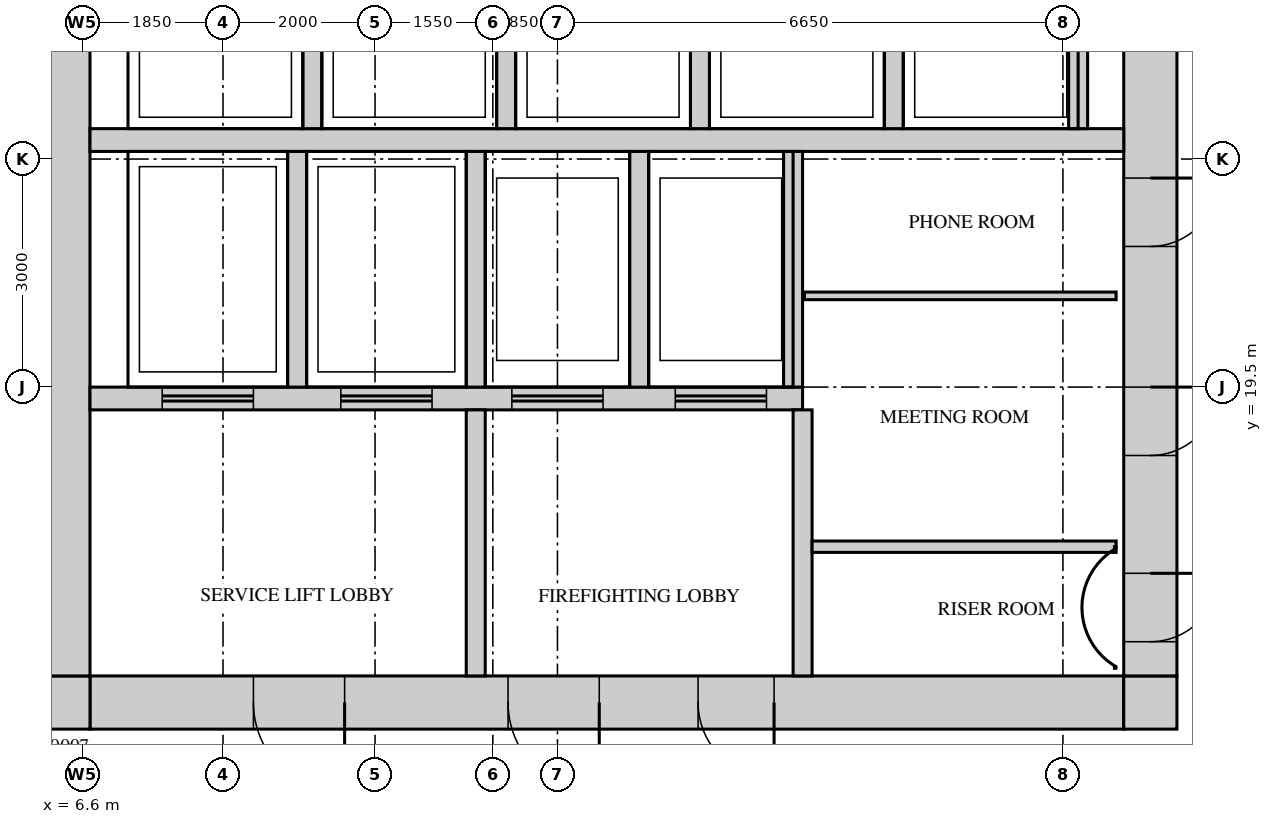
"""IFC4 building model, lengths in metres.
Left out: names, types, materials, properties, quantities, classifications, styles, units other than length and angle.
Written with IfcOpenShell. Run it as: python <this file> out.ifc"""

import sys

from ifc_helpers import new_model, si_unit, direction, frame, frame_2d, origin, place, context, subcontext, project, spatial, rectangle, extrude, source, transform, mapped, element, fill, save


model = new_model("IFC4")
c1 = context("Model", 3, precision=1e-05, world=origin(), true_north=direction((0.0, 1.0)))
c2 = subcontext(c1, "Body", "Model", "MODEL_VIEW")
j1 = project(units=[si_unit("LENGTHUNIT", "METRE"), si_unit("PLANEANGLEUNIT", "RADIAN")], contexts=[c1])
p1 = place(None, origin())
s1 = spatial("IfcSite", under=j1, at=p1, CompositionType="ELEMENT")
p2 = place(p1, origin())
s2 = spatial("IfcBuilding", under=s1, at=p2, CompositionType="ELEMENT")
p3 = place(p2, frame((0.0, 0.0, 246.2)))
s3 = spatial("IfcBuildingStorey", under=s2, at=p3, CompositionType="ELEMENT", Elevation=246.2)
m1 = source(origin(), c2, "Body", "SweptSolid", [
    extrude(rectangle(XDim=13.6, YDim=0.7, at=frame_2d((6.8, 0.0))), origin(), (0.0, 0.0, 1.0), 3.75),
])
p4 = place(p3, frame((6.7, 15.35, 0.0), z_axis=(0.0, 0.0, 1.0), x_axis=(1.0, 0.0, 0.0)))
e1 = element("IfcWall", 1, at=p4, inside=s3, PredefinedType="SHEAR", context=c2, shape_type="MappedRepresentation", body=[
    mapped(m1, transform((0.0, 0.0, 0.0))),
])
m2 = source(origin(), c2, "Body", "SweptSolid", [
    extrude(rectangle(XDim=1.2, YDim=2.1, at=frame_2d((0.6, 1.05))), frame((0.0, 0.36, 0.0), z_axis=(0.0, -1.0, 0.0), x_axis=(1.0, 0.0, 0.0)), (0.0, 0.0, 1.0), 0.72),
])
p5 = place(p4, frame((5.5, 0.0, 0.0)))
e2 = element("IfcOpeningElement", 2, at=p5, cuts=e1, PredefinedType="OPENING", context=c2, shape_type="MappedRepresentation", body=[
    mapped(m2, transform((0.0, 0.0, 0.0))),
])
p6 = place(p4, frame((2.15, 0.0, 0.0)))
e3 = element("IfcOpeningElement", 3, at=p6, cuts=e1, PredefinedType="OPENING", context=c2, shape_type="MappedRepresentation", body=[
    mapped(m2, transform((0.0, 0.0, 0.0))),
])
m3 = source(origin(), c2, "Body", "SweptSolid", [
    extrude(rectangle(XDim=1.0, YDim=2.1, at=frame_2d((0.5, 1.05))), frame((0.0, 0.36, 0.0), z_axis=(0.0, -1.0, 0.0), x_axis=(1.0, 0.0, 0.0)), (0.0, 0.0, 1.0), 0.72),
])
p7 = place(p4, frame((8.0, 0.0, 0.0)))
e4 = element("IfcOpeningElement", 4, at=p7, cuts=e1, PredefinedType="OPENING", context=c2, shape_type="MappedRepresentation", body=[
    mapped(m3, transform((0.0, 0.0, 0.0))),
])
m4 = source(origin(), c2, "Body", "SweptSolid", [
    extrude(rectangle(XDim=0.7, YDim=0.7, at=frame_2d((0.35, 0.0))), origin(), (0.0, 0.0, 1.0), 3.75),
])
for number, where, z_axis, x_axis in (
    (5, (20.3, 15.35, 0.0), (0.0, 0.0, 1.0), (1.0, 0.0, 0.0)),
    (6, (6.0, 15.35, 0.0), (0.0, 0.0, 1.0), (1.0, 0.0, 0.0)),
):
    element("IfcWall", number, at=place(p3, frame(where, z_axis=z_axis, x_axis=x_axis)), inside=s3, PredefinedType="SHEAR", context=c2, shape_type="MappedRepresentation", body=[
        mapped(m4, transform((0.0, 0.0, 0.0))),
    ])
m5 = source(origin(), c2, "Body", "SweptSolid", [
    extrude(rectangle(XDim=22.6, YDim=0.7, at=frame_2d((11.3, 0.0))), origin(), (0.0, 0.0, 1.0), 3.75),
])
p8 = place(p3, frame((20.65, 15.7, 0.0), z_axis=(0.0, 0.0, 1.0), x_axis=(0.0, 1.0, 0.0)))
e7 = element("IfcWall", 7, at=p8, inside=s3, PredefinedType="SHEAR", context=c2, shape_type="MappedRepresentation", body=[
    mapped(m5, transform((0.0, 0.0, 0.0))),
])
m6 = source(origin(), c2, "Body", "SweptSolid", [
    extrude(rectangle(XDim=1.8, YDim=2.1, at=frame_2d((0.9, 1.05))), frame((0.0, 0.36, 0.0), z_axis=(0.0, -1.0, 0.0), x_axis=(1.0, 0.0, 0.0)), (0.0, 0.0, 1.0), 0.72),
])
p9 = place(p8, frame((10.8, 0.0, 0.0)))
e8 = element("IfcOpeningElement", 8, at=p9, cuts=e7, PredefinedType="OPENING", context=c2, shape_type="MappedRepresentation", body=[
    mapped(m6, transform((0.0, 0.0, 0.0))),
])
m7 = source(origin(), c2, "Body", "SweptSolid", [
    extrude(rectangle(XDim=0.9, YDim=2.1, at=frame_2d((0.45, 1.05))), frame((0.0, 0.36, 0.0), z_axis=(0.0, -1.0, 0.0), x_axis=(1.0, 0.0, 0.0)), (0.0, 0.0, 1.0), 0.72),
])
p10 = place(p8, frame((0.45, 0.0, 0.0)))
e9 = element("IfcOpeningElement", 9, at=p10, cuts=e7, PredefinedType="OPENING", context=c2, shape_type="MappedRepresentation", body=[
    mapped(m7, transform((0.0, 0.0, 0.0))),
])
p11 = place(p8, frame((2.9, 0.0, 0.0)))
e10 = element("IfcOpeningElement", 10, at=p11, cuts=e7, PredefinedType="OPENING", context=c2, shape_type="MappedRepresentation", body=[
    mapped(m7, transform((0.0, 0.0, 0.0))),
])
p12 = place(p8, frame((5.65, 0.0, 0.0)))
e11 = element("IfcOpeningElement", 11, at=p12, cuts=e7, PredefinedType="OPENING", context=c2, shape_type="MappedRepresentation", body=[
    mapped(m7, transform((0.0, 0.0, 0.0))),
])
p13 = place(p3, frame((6.35, 15.7, 0.0), z_axis=(0.0, 0.0, 1.0), x_axis=(0.0, 1.0, 0.0)))
e12 = element("IfcWall", 12, at=p13, inside=s3, PredefinedType="SHEAR", context=c2, shape_type="MappedRepresentation", body=[
    mapped(m5, transform((0.0, 0.0, 0.0))),
])
m8 = source(origin(), c2, "Body", "SweptSolid", [
    extrude(rectangle(XDim=13.6, YDim=0.3, at=frame_2d((6.8, 0.0))), origin(), (0.0, 0.0, 1.0), 3.75),
])
p14 = place(p3, frame((6.7, 22.75, 0.0), z_axis=(0.0, 0.0, 1.0), x_axis=(1.0, 0.0, 0.0)))
e13 = element("IfcWall", 13, at=p14, inside=s3, PredefinedType="STANDARD", context=c2, shape_type="MappedRepresentation", body=[
    mapped(m8, transform((0.0, 0.0, 0.0))),
])
m9 = source(origin(), c2, "Body", "SweptSolid", [
    extrude(rectangle(XDim=9.375, YDim=0.3, at=frame_2d((4.688, 0.0))), origin(), (0.0, 0.0, 1.0), 3.75),
])
p15 = place(p3, frame((6.7, 19.35, 0.0), z_axis=(0.0, 0.0, 1.0), x_axis=(1.0, 0.0, 0.0)))
e14 = element("IfcWall", 14, at=p15, inside=s3, PredefinedType="STANDARD", context=c2, shape_type="MappedRepresentation", body=[
    mapped(m9, transform((0.0, 0.0, 0.0))),
])
m10 = source(origin(), c2, "Body", "SweptSolid", [
    extrude(rectangle(XDim=1.2, YDim=2.1, at=frame_2d((0.6, 1.05))), frame((0.0, 0.16, 0.0), z_axis=(0.0, -1.0, 0.0), x_axis=(1.0, 0.0, 0.0)), (0.0, 0.0, 1.0), 0.32),
])
p16 = place(p15, frame((0.95, 0.0, 0.0)))
e15 = element("IfcOpeningElement", 15, at=p16, cuts=e14, PredefinedType="OPENING", context=c2, shape_type="MappedRepresentation", body=[
    mapped(m10, transform((0.0, 0.0, 0.0))),
])
p17 = place(p15, frame((3.3, 0.0, 0.0)))
e16 = element("IfcOpeningElement", 16, at=p17, cuts=e14, PredefinedType="OPENING", context=c2, shape_type="MappedRepresentation", body=[
    mapped(m10, transform((0.0, 0.0, 0.0))),
])
p18 = place(p15, frame((5.55, 0.0, 0.0)))
e17 = element("IfcOpeningElement", 17, at=p18, cuts=e14, PredefinedType="OPENING", context=c2, shape_type="MappedRepresentation", body=[
    mapped(m10, transform((0.0, 0.0, 0.0))),
])
p19 = place(p15, frame((7.7, 0.0, 0.0)))
e18 = element("IfcOpeningElement", 18, at=p19, cuts=e14, PredefinedType="OPENING", context=c2, shape_type="MappedRepresentation", body=[
    mapped(m10, transform((0.0, 0.0, 0.0))),
])
m11 = source(origin(), c2, "Body", "SweptSolid", [
    extrude(rectangle(XDim=3.1, YDim=0.25, at=frame_2d((1.55, 0.0))), origin(), (0.0, 0.0, 1.0), 3.75),
])
for number, where, z_axis, x_axis in (
    (19, (9.425, 19.5, 0.0), (0.0, 0.0, 1.0), (0.0, 1.0, 0.0)),
    (20, (11.775, 19.5, 0.0), (0.0, 0.0, 1.0), (0.0, 1.0, 0.0)),
    (21, (13.925, 19.5, 0.0), (0.0, 0.0, 1.0), (0.0, 1.0, 0.0)),
    (22, (15.95, 19.5, 0.0), (0.0, 0.0, 1.0), (0.0, 1.0, 0.0)),
):
    element("IfcWall", number, at=place(p3, frame(where, z_axis=z_axis, x_axis=x_axis)), inside=s3, PredefinedType="STANDARD", context=c2, shape_type="MappedRepresentation", body=[
        mapped(m11, transform((0.0, 0.0, 0.0))),
    ])
m12 = source(origin(), c2, "Body", "SweptSolid", [
    extrude(rectangle(XDim=2.4, YDim=0.25, at=frame_2d((1.2, 0.0))), origin(), (0.0, 0.0, 1.0), 3.75),
])
for number, where, z_axis, x_axis in (
    (23, (17.275, 22.9, 0.0), (0.0, 0.0, 1.0), (0.0, 1.0, 0.0)),
    (24, (19.7, 22.9, 0.0), (0.0, 0.0, 1.0), (0.0, 1.0, 0.0)),
    (25, (9.625, 22.9, 0.0), (0.0, 0.0, 1.0), (0.0, 1.0, 0.0)),
    (26, (12.175, 22.9, 0.0), (0.0, 0.0, 1.0), (0.0, 1.0, 0.0)),
    (27, (14.725, 22.9, 0.0), (0.0, 0.0, 1.0), (0.0, 1.0, 0.0)),
):
    element("IfcWall", number, at=place(p3, frame(where, z_axis=z_axis, x_axis=x_axis)), inside=s3, PredefinedType="STANDARD", context=c2, shape_type="MappedRepresentation", body=[
        mapped(m12, transform((0.0, 0.0, 0.0))),
    ])
m13 = source(origin(), c2, "Body", "SweptSolid", [
    extrude(rectangle(XDim=3.5, YDim=0.25, at=frame_2d((1.75, 0.0))), origin(), (0.0, 0.0, 1.0), 3.75),
])
for number, where, z_axis, x_axis in (
    (28, (16.075, 15.7, 0.0), (0.0, 0.0, 1.0), (0.0, 1.0, 0.0)),
    (29, (11.775, 15.7, 0.0), (0.0, 0.0, 1.0), (0.0, 1.0, 0.0)),
):
    element("IfcWall", number, at=place(p3, frame(where, z_axis=z_axis, x_axis=x_axis)), inside=s3, PredefinedType="STANDARD", context=c2, shape_type="MappedRepresentation", body=[
        mapped(m13, transform((0.0, 0.0, 0.0))),
    ])
m14 = source(origin(), c2, "Body", "SweptSolid", [
    extrude(rectangle(XDim=4.0, YDim=0.15, at=frame_2d((2.0, 0.0))), origin(), (0.0, 0.0, 1.0), 3.8),
])
p20 = place(p3, frame((16.2, 17.4, 0.0), z_axis=(0.0, 0.0, 1.0), x_axis=(1.0, 0.0, 0.0)))
e30 = element("IfcWall", 30, at=p20, inside=s3, PredefinedType="PARTITIONING", context=c2, shape_type="MappedRepresentation", body=[
    mapped(m14, transform((0.0, 0.0, 0.0))),
])
m15 = source(origin(), c2, "Body", "SweptSolid", [
    extrude(rectangle(XDim=4.1, YDim=0.1, at=frame_2d((2.05, 0.0))), origin(), (0.0, 0.0, 1.0), 3.8),
])
p21 = place(p3, frame((16.1, 20.7, 0.0), z_axis=(0.0, 0.0, 1.0), x_axis=(1.0, 0.0, 0.0)))
e31 = element("IfcWall", 31, at=p21, inside=s3, PredefinedType="PARTITIONING", context=c2, shape_type="MappedRepresentation", body=[
    mapped(m15, transform((0.0, 0.0, 0.0))),
])
m16 = source(origin(), c2, "Body", "SweptSolid", [
    extrude(rectangle(XDim=0.9, YDim=2.1, at=frame_2d((0.45, 1.05))), frame((0.0, 0.3, 0.0), z_axis=(0.0, -1.0, 0.0), x_axis=(1.0, 0.0, 0.0)), (0.0, 0.0, 1.0), 0.6),
])
p22 = place(p10, origin())
e32 = element("IfcDoor", 32, at=p22, inside=s3, OperationType="SINGLE_SWING_RIGHT", PredefinedType="DOOR", context=c2, shape_type="MappedRepresentation", body=[
    mapped(m16, transform((0.0, 0.0, 0.0))),
])
fill(e9, e32)
p23 = place(p11, origin())
e33 = element("IfcDoor", 33, at=p23, inside=s3, OperationType="SINGLE_SWING_RIGHT", PredefinedType="DOOR", context=c2, shape_type="MappedRepresentation", body=[
    mapped(m16, transform((0.0, 0.0, 0.0))),
])
fill(e10, e33)
p24 = place(p12, origin())
e34 = element("IfcDoor", 34, at=p24, inside=s3, OperationType="SINGLE_SWING_RIGHT", PredefinedType="DOOR", context=c2, shape_type="MappedRepresentation", body=[
    mapped(m16, transform((0.0, 0.0, 0.0))),
])
fill(e11, e34)
m17 = source(origin(), c2, "Body", "SweptSolid", [
    extrude(rectangle(XDim=1.2, YDim=2.1, at=frame_2d((0.6, 1.05))), frame((0.0, 0.3, 0.0), z_axis=(0.0, -1.0, 0.0), x_axis=(1.0, 0.0, 0.0)), (0.0, 0.0, 1.0), 0.6),
])
p25 = place(p5, origin())
e35 = element("IfcDoor", 35, at=p25, inside=s3, OperationType="SINGLE_SWING_RIGHT", PredefinedType="DOOR", context=c2, shape_type="MappedRepresentation", body=[
    mapped(m17, transform((0.0, 0.0, 0.0))),
])
fill(e2, e35)
p26 = place(p6, origin())
e36 = element("IfcDoor", 36, at=p26, inside=s3, OperationType="SINGLE_SWING_RIGHT", PredefinedType="DOOR", context=c2, shape_type="MappedRepresentation", body=[
    mapped(m17, transform((0.0, 0.0, 0.0))),
])
fill(e3, e36)
m18 = source(origin(), c2, "Body", "SweptSolid", [
    extrude(rectangle(XDim=1.0, YDim=2.1, at=frame_2d((0.5, 1.05))), frame((0.0, 0.3, 0.0), z_axis=(0.0, -1.0, 0.0), x_axis=(1.0, 0.0, 0.0)), (0.0, 0.0, 1.0), 0.6),
])
p27 = place(p7, origin())
e37 = element("IfcDoor", 37, at=p27, inside=s3, OperationType="SINGLE_SWING_RIGHT", PredefinedType="DOOR", context=c2, shape_type="MappedRepresentation", body=[
    mapped(m18, transform((0.0, 0.0, 0.0))),
])
fill(e4, e37)
m19 = source(origin(), c2, "Body", "SweptSolid", [
    extrude(rectangle(XDim=1.2, YDim=2.1, at=frame_2d((0.6, 1.05))), frame((0.0, 0.025, 0.0), z_axis=(0.0, -1.0, 0.0), x_axis=(1.0, 0.0, 0.0)), (0.0, 0.0, 1.0), 0.05),
])
p28 = place(p16, origin())
e38 = element("IfcDoor", 38, at=p28, inside=s3, OperationType="DOUBLE_DOOR_SLIDING", PredefinedType="DOOR", context=c2, shape_type="MappedRepresentation", body=[
    mapped(m19, transform((0.0, 0.0, 0.0))),
])
fill(e15, e38)
p29 = place(p17, origin())
e39 = element("IfcDoor", 39, at=p29, inside=s3, OperationType="DOUBLE_DOOR_SLIDING", PredefinedType="DOOR", context=c2, shape_type="MappedRepresentation", body=[
    mapped(m19, transform((0.0, 0.0, 0.0))),
])
fill(e16, e39)
p30 = place(p18, origin())
e40 = element("IfcDoor", 40, at=p30, inside=s3, OperationType="DOUBLE_DOOR_SLIDING", PredefinedType="DOOR", context=c2, shape_type="MappedRepresentation", body=[
    mapped(m19, transform((0.0, 0.0, 0.0))),
])
fill(e17, e40)
p31 = place(p19, origin())
e41 = element("IfcDoor", 41, at=p31, inside=s3, OperationType="DOUBLE_DOOR_SLIDING", PredefinedType="DOOR", context=c2, shape_type="MappedRepresentation", body=[
    mapped(m19, transform((0.0, 0.0, 0.0))),
])
fill(e18, e41)
save(model, sys.argv[1])
